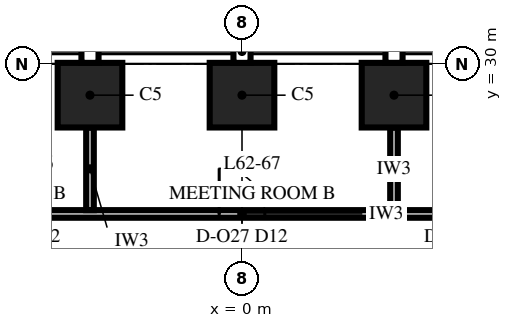
"""IFC4 building model, lengths in metres.
Left out: names, types, materials, properties, quantities, classifications, styles, units other than length and angle.
Written with IfcOpenShell. Run it as: python <this file> out.ifc"""

import sys

from ifc_helpers import new_model, si_unit, direction, frame, frame_2d, origin, origin_2d, place, context, subcontext, project, spatial, rectangle, extrude, element, fill, save


model = new_model("IFC4")
c1 = context("Model", 3, precision=1e-05, world=origin(), true_north=direction((0.0, 1.0)))
c2 = subcontext(c1, "Body", "Model", "MODEL_VIEW")
j1 = project(units=[si_unit("LENGTHUNIT", "METRE"), si_unit("PLANEANGLEUNIT", "RADIAN")], contexts=[c1])
p1 = place(None, origin())
s1 = spatial("IfcSite", under=j1, at=p1, CompositionType="ELEMENT")
p2 = place(p1, origin())
s2 = spatial("IfcBuilding", under=s1, at=p2, CompositionType="ELEMENT")
p3 = place(p2, frame((0.0, 0.0, 268.0)))
s3 = spatial("IfcBuildingStorey", under=s2, at=p3, CompositionType="ELEMENT", Elevation=268.0)
for number, where, z_axis, x_axis in (
    (1, (4.0, 29.175, 0.0), (0.0, 0.0, 1.0), (-1.0, 0.0, 0.0)),
    (2, (0.0, 29.175, 0.0), (0.0, 0.0, 1.0), (-1.0, 0.0, 0.0)),
    (3, (-4.0, 29.175, 0.0), (0.0, 0.0, 1.0), (-1.0, 0.0, 0.0)),
):
    element("IfcColumn", number, at=place(p3, frame(where, z_axis=z_axis, x_axis=x_axis)), inside=s3, PredefinedType="COLUMN", context=c2, shape_type="SweptSolid", body=[
        extrude(rectangle(XDim=1.7, YDim=1.7, at=origin_2d()), origin(), (0.0, 0.0, 1.0), 4.0),
    ])
p4 = place(p3, frame((-16.15, 26.05, 0.0), z_axis=(0.0, 0.0, 1.0), x_axis=(1.0, 0.0, 0.0)))
e4 = element("IfcWall", 4, at=p4, inside=s3, PredefinedType="PARTITIONING", context=c2, shape_type="SweptSolid", body=[
    extrude(rectangle(XDim=32.3, YDim=0.2, at=frame_2d((16.15, 0.0))), origin(), (0.0, 0.0, 1.0), 3.418),
])
p5 = place(p4, frame((1.55, 0.0, 0.0)))
e5 = element("IfcOpeningElement", 5, at=p5, cuts=e4, PredefinedType="OPENING", context=c2, shape_type="SweptSolid", body=[
    extrude(rectangle(XDim=1.2, YDim=2.4, at=frame_2d((0.6, 1.2))), frame((0.0, 0.115, 0.0), z_axis=(0.0, -1.0, 0.0), x_axis=(1.0, 0.0, 0.0)), (0.0, 0.0, 1.0), 0.23),
])
p6 = place(p4, frame((5.55, 0.0, 0.0)))
e6 = element("IfcOpeningElement", 6, at=p6, cuts=e4, PredefinedType="OPENING", context=c2, shape_type="SweptSolid", body=[
    extrude(rectangle(XDim=1.2, YDim=2.4, at=frame_2d((0.6, 1.2))), frame((0.0, 0.115, 0.0), z_axis=(0.0, -1.0, 0.0), x_axis=(1.0, 0.0, 0.0)), (0.0, 0.0, 1.0), 0.23),
])
p7 = place(p4, frame((9.55, 0.0, 0.0)))
e7 = element("IfcOpeningElement", 7, at=p7, cuts=e4, PredefinedType="OPENING", context=c2, shape_type="SweptSolid", body=[
    extrude(rectangle(XDim=1.2, YDim=2.4, at=frame_2d((0.6, 1.2))), frame((0.0, 0.115, 0.0), z_axis=(0.0, -1.0, 0.0), x_axis=(1.0, 0.0, 0.0)), (0.0, 0.0, 1.0), 0.23),
])
p8 = place(p4, frame((15.55, 0.0, 0.0)))
e8 = element("IfcOpeningElement", 8, at=p8, cuts=e4, PredefinedType="OPENING", context=c2, shape_type="SweptSolid", body=[
    extrude(rectangle(XDim=1.2, YDim=2.4, at=frame_2d((0.6, 1.2))), frame((0.0, 0.115, 0.0), z_axis=(0.0, -1.0, 0.0), x_axis=(1.0, 0.0, 0.0)), (0.0, 0.0, 1.0), 0.23),
])
p9 = place(p4, frame((21.55, 0.0, 0.0)))
e9 = element("IfcOpeningElement", 9, at=p9, cuts=e4, PredefinedType="OPENING", context=c2, shape_type="SweptSolid", body=[
    extrude(rectangle(XDim=1.2, YDim=2.4, at=frame_2d((0.6, 1.2))), frame((0.0, 0.115, 0.0), z_axis=(0.0, -1.0, 0.0), x_axis=(1.0, 0.0, 0.0)), (0.0, 0.0, 1.0), 0.23),
])
p10 = place(p4, frame((25.55, 0.0, 0.0)))
e10 = element("IfcOpeningElement", 10, at=p10, cuts=e4, PredefinedType="OPENING", context=c2, shape_type="SweptSolid", body=[
    extrude(rectangle(XDim=1.2, YDim=2.4, at=frame_2d((0.6, 1.2))), frame((0.0, 0.115, 0.0), z_axis=(0.0, -1.0, 0.0), x_axis=(1.0, 0.0, 0.0)), (0.0, 0.0, 1.0), 0.23),
])
p11 = place(p4, frame((29.55, 0.0, 0.0)))
e11 = element("IfcOpeningElement", 11, at=p11, cuts=e4, PredefinedType="OPENING", context=c2, shape_type="SweptSolid", body=[
    extrude(rectangle(XDim=1.2, YDim=2.4, at=frame_2d((0.6, 1.2))), frame((0.0, 0.115, 0.0), z_axis=(0.0, -1.0, 0.0), x_axis=(1.0, 0.0, 0.0)), (0.0, 0.0, 1.0), 0.23),
])
for number, where, z_axis, x_axis in (
    (12, (-4.0, 26.15, 0.0), (0.0, 0.0, 1.0), (0.0, 1.0, 0.0)),
    (13, (4.0, 26.15, 0.0), (0.0, 0.0, 1.0), (0.0, 1.0, 0.0)),
):
    element("IfcWall", number, at=place(p3, frame(where, z_axis=z_axis, x_axis=x_axis)), inside=s3, PredefinedType="PARTITIONING", context=c2, shape_type="SweptSolid", body=[
        extrude(rectangle(XDim=2.175, YDim=0.2, at=frame_2d((1.087, 0.0))), origin(), (0.0, 0.0, 1.0), 3.418),
    ])
p12 = place(p8, origin())
e14 = element("IfcDoor", 14, at=p12, inside=s3, OperationType="SINGLE_SWING_LEFT", PredefinedType="DOOR", context=c2, shape_type="SweptSolid", body=[
    extrude(rectangle(XDim=1.2, YDim=2.4, at=frame_2d((0.6, 1.2))), frame((0.0, 0.1, 0.0), z_axis=(0.0, -1.0, 0.0), x_axis=(1.0, 0.0, 0.0)), (0.0, 0.0, 1.0), 0.199),
])
fill(e8, e14)
save(model, sys.argv[1])
